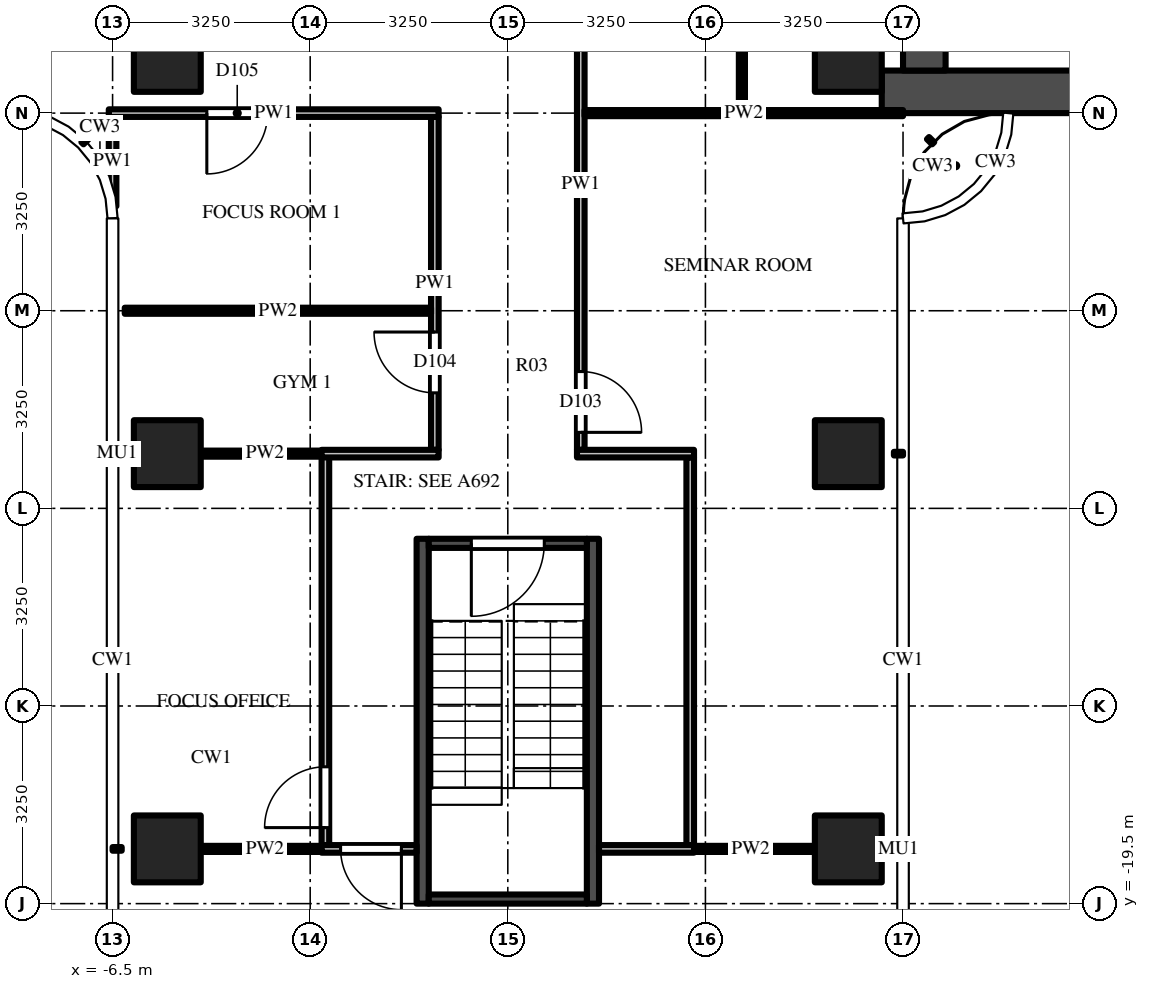
"""IFC4 building model, lengths in metres.
Left out: names, types, materials, properties, quantities, classifications, styles, units other than length and angle.
Written with IfcOpenShell. Run it as: python <this file> out.ifc"""

import sys

from ifc_helpers import new_model, si_unit, direction, frame, frame_2d, origin, origin_2d, place, context, subcontext, project, spatial, rectangle, extrude, source, transform, mapped, element, fill, save


model = new_model("IFC4")
c1 = context("Model", 3, precision=1e-05, world=origin(), true_north=direction((0.0, 1.0)))
c2 = subcontext(c1, "Body", "Model", "MODEL_VIEW")
j1 = project(units=[si_unit("LENGTHUNIT", "METRE"), si_unit("PLANEANGLEUNIT", "RADIAN")], contexts=[c1])
p1 = place(None, origin())
s1 = spatial("IfcSite", under=j1, at=p1, CompositionType="ELEMENT")
p2 = place(p1, origin())
s2 = spatial("IfcBuilding", under=s1, at=p2, CompositionType="ELEMENT")
p3 = place(p2, frame((0.0, 0.0, 224.6)))
s3 = spatial("IfcBuildingStorey", under=s2, at=p3, CompositionType="ELEMENT", Elevation=224.6)
m1 = source(origin(), c2, "Body", "SweptSolid", [
    extrude(rectangle(XDim=1.1, YDim=1.1, at=origin_2d()), origin(), (0.0, 0.0, 1.0), 3.9),
])
for number, where, z_axis, x_axis in (
    (1, (5.6, -5.6, 0.0), (0.0, 0.0, 1.0), (1.0, 0.0, 0.0)),
    (2, (-5.6, -5.6, 0.0), (0.0, 0.0, 1.0), (1.0, 0.0, 0.0)),
    (3, (5.6, -12.1, 0.0), (0.0, 0.0, 1.0), (1.0, 0.0, 0.0)),
    (4, (5.6, -18.6, 0.0), (0.0, 0.0, 1.0), (1.0, 0.0, 0.0)),
    (5, (-5.6, -12.1, 0.0), (0.0, 0.0, 1.0), (1.0, 0.0, 0.0)),
    (6, (-5.6, -18.6, 0.0), (0.0, 0.0, 1.0), (1.0, 0.0, 0.0)),
):
    element("IfcColumn", number, at=place(p3, frame(where, z_axis=z_axis, x_axis=x_axis)), inside=s3, PredefinedType="COLUMN", context=c2, shape_type="MappedRepresentation", body=[
        mapped(m1, transform((0.0, 0.0, 0.0))),
    ])
m2 = source(origin(), c2, "Body", "SweptSolid", [
    extrude(rectangle(XDim=16.6, YDim=0.7, at=frame_2d((8.3, 0.0))), origin(), (0.0, 0.0, 1.0), 3.7),
])
p4 = place(p3, frame((6.15, -6.15, 0.0), z_axis=(0.0, 0.0, 1.0), x_axis=(1.0, 0.0, 0.0)))
e7 = element("IfcWall", 7, at=p4, inside=s3, PredefinedType="SHEAR", context=c2, shape_type="MappedRepresentation", body=[
    mapped(m2, transform((0.0, 0.0, 0.0))),
])
m3 = source(origin(), c2, "Body", "SweptSolid", [
    extrude(rectangle(XDim=9.05, YDim=0.7, at=frame_2d((4.525, 0.0))), origin(), (0.0, 0.0, 1.0), 3.7),
])
p5 = place(p3, frame((6.85, -5.8, 0.0), z_axis=(0.0, 0.0, 1.0), x_axis=(0.0, 1.0, 0.0)))
e8 = element("IfcWall", 8, at=p5, inside=s3, PredefinedType="SHEAR", context=c2, shape_type="MappedRepresentation", body=[
    mapped(m3, transform((0.0, 0.0, 0.0))),
])
m4 = source(origin(), c2, "Body", "SweptSolid", [
    extrude(rectangle(XDim=1.8, YDim=2.1, at=frame_2d((0.9, 1.05))), frame((0.0, 0.36, 0.0), z_axis=(0.0, -1.0, 0.0), x_axis=(1.0, 0.0, 0.0)), (0.0, 0.0, 1.0), 0.72),
])
p6 = place(p5, frame((3.15, 0.0, 0.0)))
e9 = element("IfcOpeningElement", 9, at=p6, cuts=e8, PredefinedType="OPENING", context=c2, shape_type="MappedRepresentation", body=[
    mapped(m4, transform((0.0, 0.0, 0.0))),
])
m5 = source(origin(), c2, "Body", "SweptSolid", [
    extrude(rectangle(XDim=6.0, YDim=0.2, at=frame_2d((3.0, 0.0))), origin(), (0.0, 0.0, 1.0), 3.7),
])
for number, where, z_axis, x_axis in (
    (10, (1.4, -13.5, 0.0), (0.0, 0.0, 1.0), (0.0, -1.0, 0.0)),
    (11, (-1.4, -13.5, 0.0), (0.0, 0.0, 1.0), (0.0, -1.0, 0.0)),
):
    element("IfcWall", number, at=place(p3, frame(where, z_axis=z_axis, x_axis=x_axis)), inside=s3, PredefinedType="SHEAR", context=c2, shape_type="MappedRepresentation", body=[
        mapped(m5, transform((0.0, 0.0, 0.0))),
    ])
m6 = source(origin(), c2, "Body", "SweptSolid", [
    extrude(rectangle(XDim=2.6, YDim=0.15, at=frame_2d((1.3, 0.0))), origin(), (0.0, 0.0, 1.0), 3.7),
])
p7 = place(p3, frame((1.3, -13.575, 0.0), z_axis=(0.0, 0.0, 1.0), x_axis=(-1.0, 0.0, 0.0)))
e12 = element("IfcWall", 12, at=p7, inside=s3, PredefinedType="SHEAR", context=c2, shape_type="MappedRepresentation", body=[
    mapped(m6, transform((0.0, 0.0, 0.0))),
])
m7 = source(origin(), c2, "Body", "SweptSolid", [
    extrude(rectangle(XDim=1.2, YDim=2.1, at=frame_2d((0.6, 1.05))), frame((0.0, 0.085, 0.0), z_axis=(0.0, -1.0, 0.0), x_axis=(1.0, 0.0, 0.0)), (0.0, 0.0, 1.0), 0.17),
])
p8 = place(p7, frame((0.7, 0.0, 0.0)))
e13 = element("IfcOpeningElement", 13, at=p8, cuts=e12, PredefinedType="OPENING", context=c2, shape_type="MappedRepresentation", body=[
    mapped(m7, transform((0.0, 0.0, 0.0))),
])
p9 = place(p3, frame((1.3, -19.425, 0.0), z_axis=(0.0, 0.0, 1.0), x_axis=(-1.0, 0.0, 0.0)))
e14 = element("IfcWall", 14, at=p9, inside=s3, PredefinedType="SHEAR", context=c2, shape_type="MappedRepresentation", body=[
    mapped(m6, transform((0.0, 0.0, 0.0))),
])
m8 = source(origin(), c2, "Body", "SweptSolid", [
    extrude(rectangle(XDim=1.469, YDim=0.125, at=frame_2d((0.734, 0.0))), origin(), (0.0, 0.0, 1.0), 3.7),
])
p10 = place(p3, frame((-6.5, -6.562, 0.0), z_axis=(0.0, 0.0, 1.0), x_axis=(0.0, -1.0, 0.0)))
e15 = element("IfcWall", 15, at=p10, inside=s3, PredefinedType="PARTITIONING", context=c2, shape_type="MappedRepresentation", body=[
    mapped(m8, transform((0.0, 0.0, 0.0))),
])
m9 = source(origin(), c2, "Body", "SweptSolid", [
    extrude(rectangle(XDim=6.4, YDim=0.125, at=frame_2d((3.2, 0.0))), origin(), (0.0, 0.0, 1.0), 2.997),
])
p11 = place(p3, frame((-3.0, -18.55, 0.0), z_axis=(0.0, 0.0, 1.0), x_axis=(0.0, 1.0, 0.0)))
e16 = element("IfcWall", 16, at=p11, inside=s3, PredefinedType="PARTITIONING", context=c2, shape_type="MappedRepresentation", body=[
    mapped(m9, transform((0.0, 0.0, 0.0))),
])
m10 = source(origin(), c2, "Body", "SweptSolid", [
    extrude(rectangle(XDim=1.0, YDim=2.1, at=frame_2d((0.5, 1.05))), frame((0.0, 0.073, 0.0), z_axis=(0.0, -1.0, 0.0), x_axis=(1.0, 0.0, 0.0)), (0.0, 0.0, 1.0), 0.145),
])
p12 = place(p11, frame((0.3, 0.0, 0.0)))
e17 = element("IfcOpeningElement", 17, at=p12, cuts=e16, PredefinedType="OPENING", context=c2, shape_type="MappedRepresentation", body=[
    mapped(m10, transform((0.0, 0.0, 0.0))),
])
m11 = source(origin(), c2, "Body", "SweptSolid", [
    extrude(rectangle(XDim=5.475, YDim=0.125, at=frame_2d((2.738, 0.0))), origin(), (0.0, 0.0, 1.0), 2.997),
])
p13 = place(p3, frame((-1.2, -12.038, 0.0), z_axis=(0.0, 0.0, 1.0), x_axis=(0.0, 1.0, 0.0)))
e18 = element("IfcWall", 18, at=p13, inside=s3, PredefinedType="PARTITIONING", context=c2, shape_type="MappedRepresentation", body=[
    mapped(m11, transform((0.0, 0.0, 0.0))),
])
p14 = place(p13, frame((0.938, 0.0, 0.0)))
e19 = element("IfcOpeningElement", 19, at=p14, cuts=e18, PredefinedType="OPENING", context=c2, shape_type="MappedRepresentation", body=[
    mapped(m10, transform((0.0, 0.0, 0.0))),
])
m12 = source(origin(), c2, "Body", "SweptSolid", [
    extrude(rectangle(XDim=8.725, YDim=0.125, at=frame_2d((4.363, 0.0))), origin(), (0.0, 0.0, 1.0), 2.997),
])
p15 = place(p3, frame((1.2, -3.312, 0.0), z_axis=(0.0, 0.0, 1.0), x_axis=(0.0, -1.0, 0.0)))
e20 = element("IfcWall", 20, at=p15, inside=s3, PredefinedType="PARTITIONING", context=c2, shape_type="MappedRepresentation", body=[
    mapped(m12, transform((0.0, 0.0, 0.0))),
])
p16 = place(p15, frame((7.438, 0.0, 0.0)))
e21 = element("IfcOpeningElement", 21, at=p16, cuts=e20, PredefinedType="OPENING", context=c2, shape_type="MappedRepresentation", body=[
    mapped(m10, transform((0.0, 0.0, 0.0))),
])
m13 = source(origin(), c2, "Body", "SweptSolid", [
    extrude(rectangle(XDim=1.1, YDim=2.1, at=frame_2d((0.55, 1.05))), frame((0.0, 0.073, 0.0), z_axis=(0.0, -1.0, 0.0), x_axis=(1.0, 0.0, 0.0)), (0.0, 0.0, 1.0), 0.145),
])
p17 = place(p15, frame((0.288, 0.0, 0.0)))
e22 = element("IfcOpeningElement", 22, at=p17, cuts=e20, PredefinedType="OPENING", context=c2, shape_type="MappedRepresentation", body=[
    mapped(m13, transform((0.0, 0.0, 0.0))),
])
m14 = source(origin(), c2, "Body", "SweptSolid", [
    extrude(rectangle(XDim=6.387, YDim=0.125, at=frame_2d((3.194, 0.0))), origin(), (0.0, 0.0, 1.0), 2.997),
])
p18 = place(p3, frame((3.0, -12.163, 0.0), z_axis=(0.0, 0.0, 1.0), x_axis=(0.0, -1.0, 0.0)))
e23 = element("IfcWall", 23, at=p18, inside=s3, PredefinedType="PARTITIONING", context=c2, shape_type="MappedRepresentation", body=[
    mapped(m14, transform((0.0, 0.0, 0.0))),
])
m15 = source(origin(), c2, "Body", "SweptSolid", [
    extrude(rectangle(XDim=3.137, YDim=0.1, at=frame_2d((1.569, 0.0))), origin(), (0.0, 0.0, 1.0), 2.997),
])
p19 = place(p3, frame((3.85, -6.45, 0.0), z_axis=(0.0, 0.0, 1.0), x_axis=(0.0, 1.0, 0.0)))
e24 = element("IfcWall", 24, at=p19, inside=s3, PredefinedType="PARTITIONING", context=c2, shape_type="MappedRepresentation", body=[
    mapped(m15, transform((0.0, 0.0, 0.0))),
])
m16 = source(origin(), c2, "Body", "SweptSolid", [
    extrude(rectangle(XDim=2.113, YDim=0.1, at=frame_2d((1.056, 0.0))), origin(), (0.0, 0.0, 1.0), 3.223),
])
for number, where, z_axis, x_axis in (
    (25, (-5.05, -18.6, 0.0), (0.0, 0.0, 1.0), (1.0, 0.0, 0.0)),
    (26, (2.938, -18.6, 0.0), (0.0, 0.0, 1.0), (1.0, 0.0, 0.0)),
):
    element("IfcWall", number, at=place(p3, frame(where, z_axis=z_axis, x_axis=x_axis)), inside=s3, PredefinedType="PARTITIONING", context=c2, shape_type="MappedRepresentation", body=[
        mapped(m16, transform((0.0, 0.0, 0.0))),
    ])
m17 = source(origin(), c2, "Body", "SweptSolid", [
    extrude(rectangle(XDim=1.562, YDim=0.125, at=frame_2d((0.781, 0.0))), origin(), (0.0, 0.0, 1.0), 3.223),
])
p20 = place(p3, frame((-1.5, -18.6, 0.0), z_axis=(0.0, 0.0, 1.0), x_axis=(-1.0, 0.0, 0.0)))
e27 = element("IfcWall", 27, at=p20, inside=s3, PredefinedType="PARTITIONING", context=c2, shape_type="MappedRepresentation", body=[
    mapped(m17, transform((0.0, 0.0, 0.0))),
])
p21 = place(p20, frame((0.25, 0.0, 0.0)))
e28 = element("IfcOpeningElement", 28, at=p21, cuts=e27, PredefinedType="OPENING", context=c2, shape_type="MappedRepresentation", body=[
    mapped(m10, transform((0.0, 0.0, 0.0))),
])
p22 = place(p3, frame((3.062, -18.6, 0.0), z_axis=(0.0, 0.0, 1.0), x_axis=(-1.0, 0.0, 0.0)))
e29 = element("IfcWall", 29, at=p22, inside=s3, PredefinedType="PARTITIONING", context=c2, shape_type="MappedRepresentation", body=[
    mapped(m17, transform((0.0, 0.0, 0.0))),
])
m18 = source(origin(), c2, "Body", "SweptSolid", [
    extrude(rectangle(XDim=2.113, YDim=0.1, at=frame_2d((1.056, 0.0))), origin(), (0.0, 0.0, 1.0), 2.997),
])
p23 = place(p3, frame((-5.05, -12.1, 0.0), z_axis=(0.0, 0.0, 1.0), x_axis=(1.0, 0.0, 0.0)))
e30 = element("IfcWall", 30, at=p23, inside=s3, PredefinedType="PARTITIONING", context=c2, shape_type="MappedRepresentation", body=[
    mapped(m18, transform((0.0, 0.0, 0.0))),
])
m19 = source(origin(), c2, "Body", "SweptSolid", [
    extrude(rectangle(XDim=1.925, YDim=0.125, at=frame_2d((0.962, 0.0))), origin(), (0.0, 0.0, 1.0), 2.997),
])
for number, where, z_axis, x_axis in (
    (31, (-3.062, -12.1, 0.0), (0.0, 0.0, 1.0), (1.0, 0.0, 0.0)),
    (32, (1.137, -12.1, 0.0), (0.0, 0.0, 1.0), (1.0, 0.0, 0.0)),
):
    element("IfcWall", number, at=place(p3, frame(where, z_axis=z_axis, x_axis=x_axis)), inside=s3, PredefinedType="PARTITIONING", context=c2, shape_type="MappedRepresentation", body=[
        mapped(m19, transform((0.0, 0.0, 0.0))),
    ])
m20 = source(origin(), c2, "Body", "SweptSolid", [
    extrude(rectangle(XDim=5.038, YDim=0.1, at=frame_2d((2.519, 0.0))), origin(), (0.0, 0.0, 1.0), 2.78),
])
p24 = place(p3, frame((-6.3, -9.75, 0.0), z_axis=(0.0, 0.0, 1.0), x_axis=(1.0, 0.0, 0.0)))
e33 = element("IfcWall", 33, at=p24, inside=s3, PredefinedType="PARTITIONING", context=c2, shape_type="MappedRepresentation", body=[
    mapped(m20, transform((0.0, 0.0, 0.0))),
])
m21 = source(origin(), c2, "Body", "SweptSolid", [
    extrude(rectangle(XDim=5.238, YDim=0.1, at=frame_2d((2.619, 0.0))), origin(), (0.0, 0.0, 1.0), 2.78),
])
p25 = place(p3, frame((1.262, -6.5, 0.0), z_axis=(0.0, 0.0, 1.0), x_axis=(1.0, 0.0, 0.0)))
e34 = element("IfcWall", 34, at=p25, inside=s3, PredefinedType="PARTITIONING", context=c2, shape_type="MappedRepresentation", body=[
    mapped(m21, transform((0.0, 0.0, 0.0))),
])
m22 = source(origin(), c2, "Body", "SweptSolid", [
    extrude(rectangle(XDim=5.425, YDim=0.125, at=frame_2d((2.712, 0.0))), origin(), (0.0, 0.0, 1.0), 2.78),
])
p26 = place(p3, frame((-1.137, -6.5, 0.0), z_axis=(0.0, 0.0, 1.0), x_axis=(-1.0, 0.0, 0.0)))
e35 = element("IfcWall", 35, at=p26, inside=s3, PredefinedType="PARTITIONING", context=c2, shape_type="MappedRepresentation", body=[
    mapped(m22, transform((0.0, 0.0, 0.0))),
])
p27 = place(p26, frame((2.812, 0.0, 0.0)))
e36 = element("IfcOpeningElement", 36, at=p27, cuts=e35, PredefinedType="OPENING", context=c2, shape_type="MappedRepresentation", body=[
    mapped(m10, transform((0.0, 0.0, 0.0))),
])
m23 = source(origin(), c2, "Body", "SweptSolid", [
    extrude(rectangle(XDim=1.2, YDim=2.1, at=frame_2d((0.6, 1.05))), frame((0.0, 0.025, 0.0), z_axis=(0.0, -1.0, 0.0), x_axis=(1.0, 0.0, 0.0)), (0.0, 0.0, 1.0), 0.05),
])
p28 = place(p8, origin())
e37 = element("IfcDoor", 37, at=p28, inside=s3, OperationType="SINGLE_SWING_RIGHT", PredefinedType="DOOR", context=c2, shape_type="MappedRepresentation", body=[
    mapped(m23, transform((0.0, 0.0, 0.0))),
])
fill(e13, e37)
m24 = source(origin(), c2, "Body", "SweptSolid", [
    extrude(rectangle(XDim=1.0, YDim=2.1, at=frame_2d((0.5, 1.05))), frame((0.0, 0.025, 0.0), z_axis=(0.0, -1.0, 0.0), x_axis=(1.0, 0.0, 0.0)), (0.0, 0.0, 1.0), 0.05),
])
p29 = place(p21, origin())
e38 = element("IfcDoor", 38, at=p29, inside=s3, OperationType="SINGLE_SWING_LEFT", PredefinedType="DOOR", context=c2, shape_type="MappedRepresentation", body=[
    mapped(m24, transform((0.0, 0.0, 0.0))),
])
fill(e28, e38)
p30 = place(p12, origin())
e39 = element("IfcDoor", 39, at=p30, inside=s3, OperationType="SINGLE_SWING_LEFT", PredefinedType="DOOR", context=c2, shape_type="MappedRepresentation", body=[
    mapped(m24, transform((0.0, 0.0, 0.0))),
])
fill(e17, e39)
p31 = place(p16, origin())
e40 = element("IfcDoor", 40, at=p31, inside=s3, OperationType="SINGLE_SWING_RIGHT", PredefinedType="DOOR", context=c2, shape_type="MappedRepresentation", body=[
    mapped(m24, transform((0.0, 0.0, 0.0))),
])
fill(e21, e40)
p32 = place(p14, origin())
e41 = element("IfcDoor", 41, at=p32, inside=s3, OperationType="SINGLE_SWING_RIGHT", PredefinedType="DOOR", context=c2, shape_type="MappedRepresentation", body=[
    mapped(m24, transform((0.0, 0.0, 0.0))),
])
fill(e19, e41)
p33 = place(p27, origin())
e42 = element("IfcDoor", 42, at=p33, inside=s3, OperationType="SINGLE_SWING_RIGHT", PredefinedType="DOOR", context=c2, shape_type="MappedRepresentation", body=[
    mapped(m24, transform((0.0, 0.0, 0.0))),
])
fill(e36, e42)
save(model, sys.argv[1])
